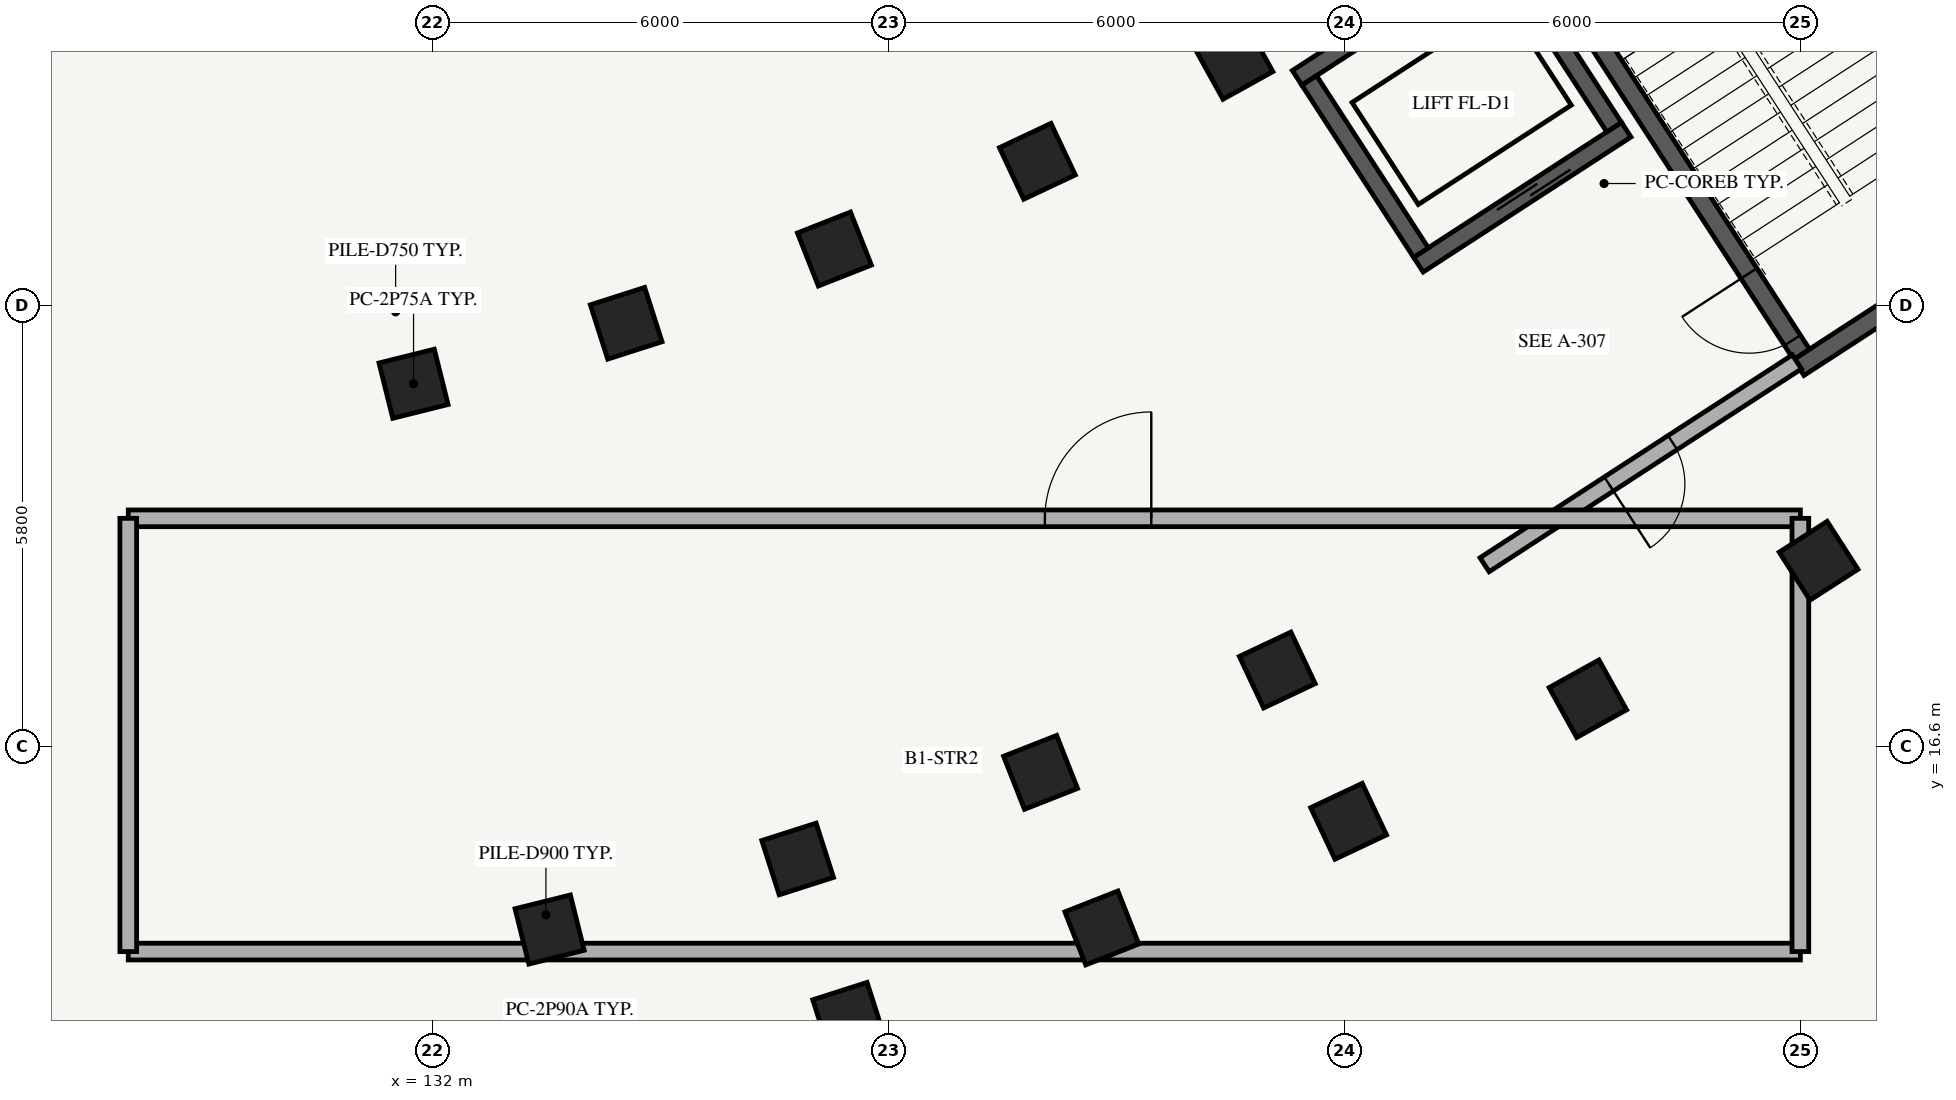
"""IFC4 building model, lengths in metres.
Left out: names, types, materials, properties, quantities, classifications, styles, units other than length and angle.
Written with IfcOpenShell. Run it as: python <this file> out.ifc"""

import sys

from ifc_helpers import new_model, si_unit, direction, frame, frame_2d, origin, origin_2d, place, context, subcontext, project, spatial, rectangle, extrude, element, fill, save


model = new_model("IFC4")
c1 = context("Model", 3, precision=1e-05, world=origin(), true_north=direction((0.0, 1.0)))
c2 = subcontext(c1, "Body", "Model", "MODEL_VIEW")
j1 = project(units=[si_unit("LENGTHUNIT", "METRE"), si_unit("PLANEANGLEUNIT", "RADIAN")], contexts=[c1])
p1 = place(None, origin())
s1 = spatial("IfcSite", under=j1, at=p1, CompositionType="ELEMENT")
p2 = place(p1, origin())
s2 = spatial("IfcBuilding", under=s1, at=p2, CompositionType="ELEMENT")
p3 = place(p2, frame((0.0, 0.0, -4.2)))
s3 = spatial("IfcBuildingStorey", under=s2, at=p3, CompositionType="ELEMENT", Elevation=-4.2)
p4 = place(p3, frame((152.674, 23.484, 0.0), z_axis=(0.0, 0.0, 1.0), x_axis=(-0.544655453679, 0.838659905312, 0.0)))
e1 = element("IfcWall", 1, at=p4, inside=s3, PredefinedType="SHEAR", context=c2, shape_type="SweptSolid", body=[
    extrude(rectangle(XDim=6.6, YDim=0.25, at=frame_2d((3.3, 0.0))), origin(), (0.0, 0.0, 1.0), 3.92),
])
p5 = place(p3, frame((152.847, 23.447, 0.0), z_axis=(0.0, 0.0, 1.0), x_axis=(-0.838645798734, -0.544677174357, 0.0)))
e2 = element("IfcWall", 2, at=p5, inside=s3, PredefinedType="SHEAR", context=c2, shape_type="SweptSolid", body=[
    extrude(rectangle(XDim=3.42, YDim=0.25, at=frame_2d((1.71, 0.0))), origin(), (0.0, 0.0, 1.0), 3.92),
])
p6 = place(p3, frame((150.015, 21.757, 0.0), z_axis=(0.0, 0.0, 1.0), x_axis=(-0.544629435258, 0.838676802022, 0.0)))
e3 = element("IfcWall", 3, at=p6, inside=s3, PredefinedType="SHEAR", context=c2, shape_type="SweptSolid", body=[
    extrude(rectangle(XDim=6.6, YDim=0.25, at=frame_2d((3.3, 0.0))), origin(), (0.0, 0.0, 1.0), 3.92),
])
p7 = place(p6, frame((0.22, 0.0, 0.0)))
e4 = element("IfcOpeningElement", 4, at=p7, cuts=e3, PredefinedType="OPENING", context=c2, shape_type="SweptSolid", body=[
    extrude(rectangle(XDim=1.05, YDim=2.15, at=frame_2d((0.525, 1.075))), frame((0.0, 0.135, 0.0), z_axis=(0.0, -1.0, 0.0), x_axis=(1.0, 0.0, 0.0)), (0.0, 0.0, 1.0), 0.27),
])
p8 = place(p3, frame((147.708, 24.713, 0.0), z_axis=(0.0, 0.0, 1.0), x_axis=(-0.838672833615, -0.544635546173, 0.0)))
e5 = element("IfcWall", 5, at=p8, inside=s3, PredefinedType="SHEAR", context=c2, shape_type="SweptSolid", body=[
    extrude(rectangle(XDim=3.26, YDim=0.23, at=frame_2d((1.63, 0.0))), origin(), (0.0, 0.0, 1.0), 3.92),
])
p9 = place(p8, frame((0.9, 0.0, 0.0)))
e6 = element("IfcOpeningElement", 6, at=p9, cuts=e5, PredefinedType="OPENING", context=c2, shape_type="SweptSolid", body=[
    extrude(rectangle(XDim=1.1, YDim=2.15, at=frame_2d((0.55, 1.075))), frame((0.0, 0.125, 0.0), z_axis=(0.0, -1.0, 0.0), x_axis=(1.0, 0.0, 0.0)), (0.0, 0.0, 1.0), 0.25),
])
p10 = place(p3, frame((146.113, 27.17, 0.0), z_axis=(0.0, 0.0, 1.0), x_axis=(-0.838695047431, -0.544601338058, 0.0)))
e7 = element("IfcWall", 7, at=p10, inside=s3, PredefinedType="SHEAR", context=c2, shape_type="SweptSolid", body=[
    extrude(rectangle(XDim=3.26, YDim=0.23, at=frame_2d((1.63, 0.0))), origin(), (0.0, 0.0, 1.0), 3.92),
])
for number, where, z_axis, x_axis in (
    (8, (147.55, 24.747, 0.0), (0.0, 0.0, 1.0), (-0.545, 0.839, 0.0)),
    (9, (145.008, 23.096, 0.0), (0.0, 0.0, 1.0), (-0.545, 0.839, 0.0)),
):
    element("IfcWall", number, at=place(p3, frame(where, z_axis=z_axis, x_axis=x_axis)), inside=s3, PredefinedType="SHEAR", context=c2, shape_type="SweptSolid", body=[
        extrude(rectangle(XDim=2.7, YDim=0.23, at=frame_2d((1.35, 0.0))), origin(), (0.0, 0.0, 1.0), 3.92),
    ])
for number, where, z_axis, x_axis in (
    (10, (131.753, 21.37, 0.0), (0.0, 0.0, 1.0), (0.242, -0.97, 0.0)),
    (11, (133.544, 14.19, 0.0), (0.0, 0.0, 1.0), (0.242, -0.97, 0.0)),
    (12, (134.551, 22.166, 0.0), (0.0, 0.0, 1.0), (0.305, -0.952, 0.0)),
    (13, (136.807, 15.118, 0.0), (0.0, 0.0, 1.0), (0.305, -0.952, 0.0)),
    (14, (137.478, 13.023, 0.0), (0.0, 0.0, 1.0), (0.305, -0.952, 0.0)),
    (15, (137.291, 23.143, 0.0), (0.0, 0.0, 1.0), (0.367, -0.93, 0.0)),
    (16, (140.003, 16.258, 0.0), (0.0, 0.0, 1.0), (0.367, -0.93, 0.0)),
    (17, (140.809, 14.211, 0.0), (0.0, 0.0, 1.0), (0.367, -0.93, 0.0)),
    (18, (139.961, 24.297, 0.0), (0.0, 0.0, 1.0), (0.427, -0.904, 0.0)),
    (19, (143.118, 17.604, 0.0), (0.0, 0.0, 1.0), (0.427, -0.904, 0.0)),
    (20, (144.056, 15.614, 0.0), (0.0, 0.0, 1.0), (0.427, -0.904, 0.0)),
    (21, (142.55, 25.623, 0.0), (0.0, 0.0, 1.0), (0.485, -0.875, 0.0)),
    (22, (147.204, 17.227, 0.0), (0.0, 0.0, 1.0), (0.485, -0.875, 0.0)),
    (23, (150.24, 19.042, 0.0), (0.0, 0.0, 1.0), (0.541, -0.841, 0.0)),
):
    element("IfcColumn", number, at=place(p3, frame(where, z_axis=z_axis, x_axis=x_axis)), inside=s3, PredefinedType="COLUMN", context=c2, shape_type="SweptSolid", body=[
        extrude(rectangle(XDim=0.75, YDim=0.75, at=origin_2d()), origin(), (0.0, 0.0, 1.0), 3.92),
    ])
p11 = place(p3, frame((149.955, 21.658, 0.0), z_axis=(0.0, 0.0, 1.0), x_axis=(-0.838681446513, -0.544622283124, 0.0)))
e24 = element("IfcWall", 24, at=p11, inside=s3, PredefinedType="PARTITIONING", context=c2, shape_type="SweptSolid", body=[
    extrude(rectangle(XDim=4.9, YDim=0.22, at=frame_2d((2.45, 0.0))), origin(), (0.0, 0.0, 1.0), 3.18),
])
p12 = place(p11, frame((1.95, 0.0, 0.0)))
e25 = element("IfcOpeningElement", 25, at=p12, cuts=e24, PredefinedType="OPENING", context=c2, shape_type="SweptSolid", body=[
    extrude(rectangle(XDim=1.0, YDim=2.15, at=frame_2d((0.5, 1.075))), frame((0.0, 0.12, 0.0), z_axis=(0.0, -1.0, 0.0), x_axis=(1.0, 0.0, 0.0)), (0.0, 0.0, 1.0), 0.24),
])
p13 = place(p3, frame((128.0, 19.6, 0.0), z_axis=(0.0, 0.0, 1.0), x_axis=(1.0, 0.0, 0.0)))
e26 = element("IfcWall", 26, at=p13, inside=s3, PredefinedType="PARTITIONING", context=c2, shape_type="SweptSolid", body=[
    extrude(rectangle(XDim=22.0, YDim=0.22, at=frame_2d((11.0, 0.0))), origin(), (0.0, 0.0, 1.0), 2.85),
])
p14 = place(p13, frame((12.06, 0.0, 0.0)))
e27 = element("IfcOpeningElement", 27, at=p14, cuts=e26, PredefinedType="OPENING", context=c2, shape_type="SweptSolid", body=[
    extrude(rectangle(XDim=1.4, YDim=2.15, at=frame_2d((0.7, 1.075))), frame((0.0, 0.12, 0.0), z_axis=(0.0, -1.0, 0.0), x_axis=(1.0, 0.0, 0.0)), (0.0, 0.0, 1.0), 0.24),
])
p15 = place(p3, frame((128.0, 13.9, 0.0), z_axis=(0.0, 0.0, 1.0), x_axis=(1.0, 0.0, 0.0)))
e28 = element("IfcWall", 28, at=p15, inside=s3, PredefinedType="PARTITIONING", context=c2, shape_type="SweptSolid", body=[
    extrude(rectangle(XDim=22.0, YDim=0.22, at=frame_2d((11.0, 0.0))), origin(), (0.0, 0.0, 1.0), 2.85),
])
for number, where, z_axis, x_axis in (
    (29, (128.0, 13.9, 0.0), (0.0, 0.0, 1.0), (0.0, 1.0, 0.0)),
    (30, (150.0, 13.9, 0.0), (0.0, 0.0, 1.0), (0.0, 1.0, 0.0)),
):
    element("IfcWall", number, at=place(p3, frame(where, z_axis=z_axis, x_axis=x_axis)), inside=s3, PredefinedType="PARTITIONING", context=c2, shape_type="SweptSolid", body=[
        extrude(rectangle(XDim=5.7, YDim=0.22, at=frame_2d((2.85, 0.0))), origin(), (0.0, 0.0, 1.0), 2.85),
    ])
p16 = place(p7, origin())
e31 = element("IfcDoor", 31, at=p16, inside=s3, OperationType="SINGLE_SWING_RIGHT", PredefinedType="DOOR", context=c2, shape_type="SweptSolid", body=[
    extrude(rectangle(XDim=1.05, YDim=2.15, at=frame_2d((0.525, 1.075))), frame((0.0, 0.025, 0.0), z_axis=(0.0, -1.0, 0.0), x_axis=(1.0, 0.0, 0.0)), (0.0, 0.0, 1.0), 0.05),
])
fill(e4, e31)
p17 = place(p9, origin())
e32 = element("IfcDoor", 32, at=p17, inside=s3, OperationType="DOUBLE_DOOR_SLIDING", PredefinedType="DOOR", context=c2, shape_type="SweptSolid", body=[
    extrude(rectangle(XDim=1.1, YDim=2.15, at=frame_2d((0.55, 1.075))), frame((0.0, 0.025, 0.0), z_axis=(0.0, -1.0, 0.0), x_axis=(1.0, 0.0, 0.0)), (0.0, 0.0, 1.0), 0.05),
])
fill(e6, e32)
p18 = place(p12, origin())
e33 = element("IfcDoor", 33, at=p18, inside=s3, OperationType="SINGLE_SWING_RIGHT", PredefinedType="DOOR", context=c2, shape_type="SweptSolid", body=[
    extrude(rectangle(XDim=1.0, YDim=2.15, at=frame_2d((0.5, 1.075))), frame((0.0, 0.025, 0.0), z_axis=(0.0, -1.0, 0.0), x_axis=(1.0, 0.0, 0.0)), (0.0, 0.0, 1.0), 0.05),
])
fill(e25, e33)
p19 = place(p14, origin())
e34 = element("IfcDoor", 34, at=p19, inside=s3, OperationType="DOUBLE_DOOR_SINGLE_SWING", PredefinedType="DOOR", context=c2, shape_type="SweptSolid", body=[
    extrude(rectangle(XDim=1.4, YDim=2.15, at=frame_2d((0.7, 1.075))), frame((0.0, 0.025, 0.0), z_axis=(0.0, -1.0, 0.0), x_axis=(1.0, 0.0, 0.0)), (0.0, 0.0, 1.0), 0.05),
])
fill(e27, e34)
save(model, sys.argv[1])
